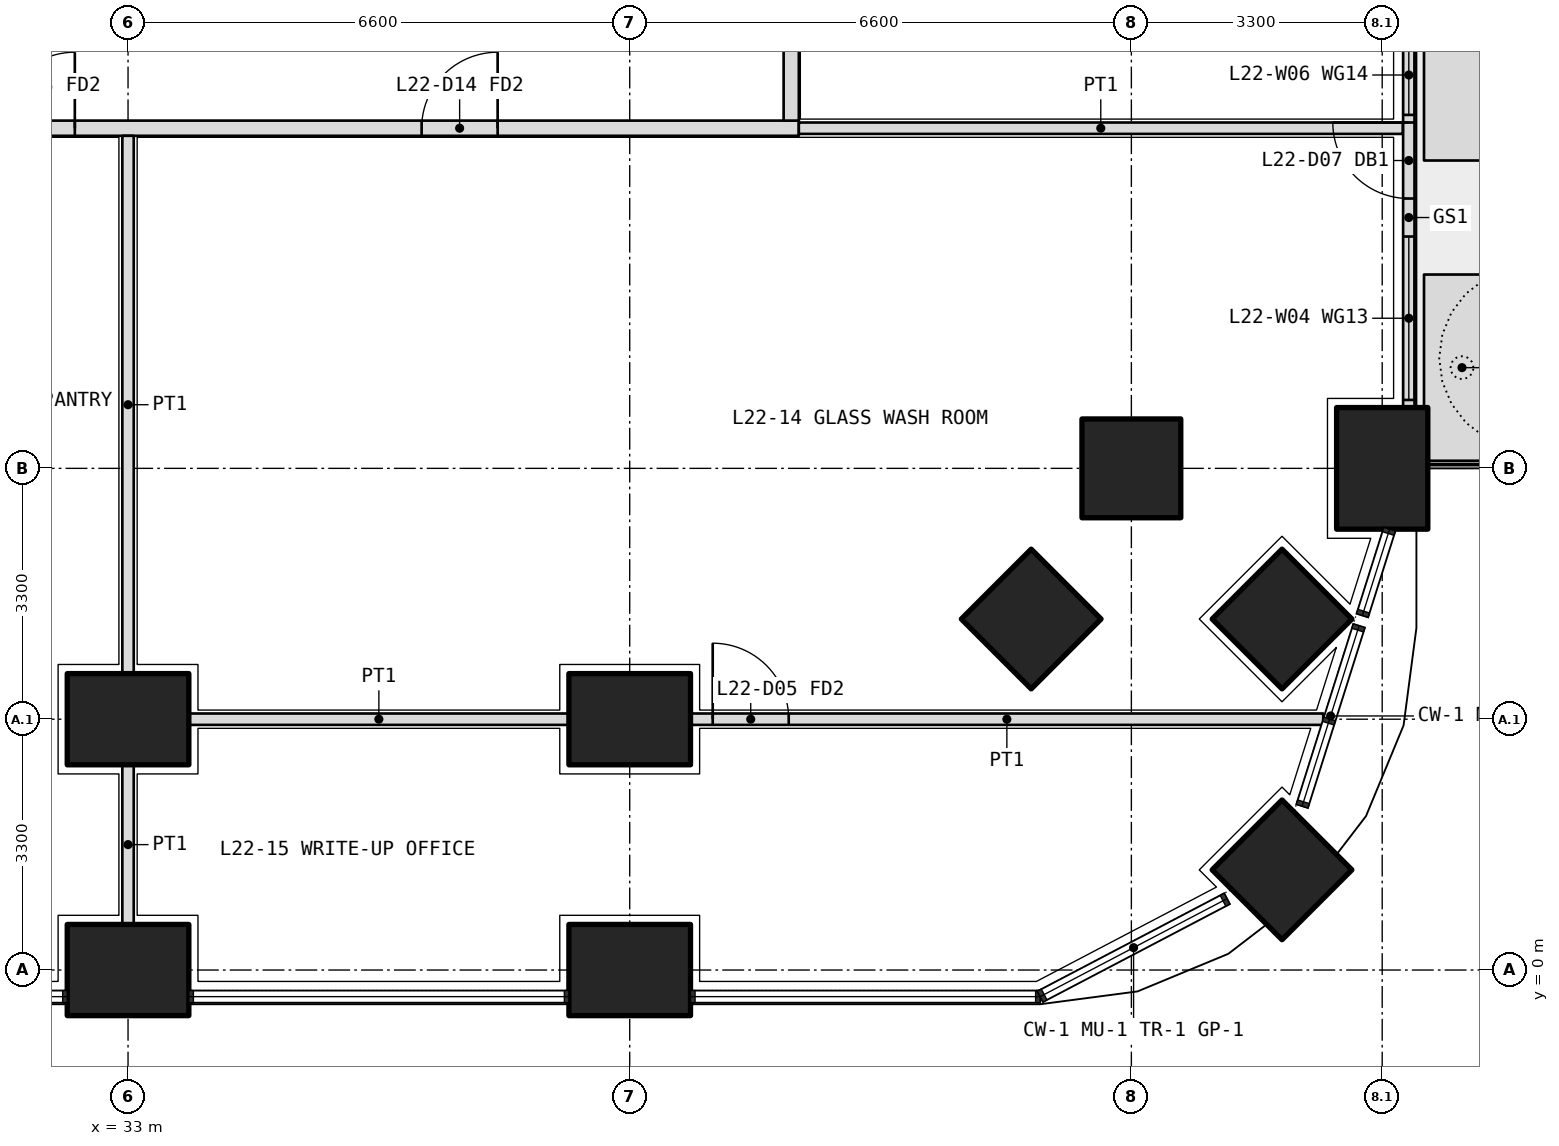
"""IFC4 building model, lengths in metres.
Left out: names, types, materials, properties, quantities, classifications, styles, units other than length and angle.
Written with IfcOpenShell. Run it as: python <this file> out.ifc"""

import sys

from ifc_helpers import new_model, si_unit, direction, frame, frame_2d, origin, origin_2d, place, context, subcontext, project, spatial, polyline, rectangle, outline, extrude, element, fill, save


model = new_model("IFC4")
c1 = context("Model", 3, precision=1e-05, world=origin(), true_north=direction((0.0, 1.0)))
c2 = subcontext(c1, "Body", "Model", "MODEL_VIEW")
j1 = project(units=[si_unit("LENGTHUNIT", "METRE"), si_unit("PLANEANGLEUNIT", "RADIAN")], contexts=[c1])
p1 = place(None, origin())
s1 = spatial("IfcSite", under=j1, at=p1, CompositionType="ELEMENT")
p2 = place(p1, origin())
s2 = spatial("IfcBuilding", under=s1, at=p2, CompositionType="ELEMENT")
p3 = place(p2, frame((0.0, 0.0, 99.0)))
s3 = spatial("IfcBuildingStorey", under=s2, at=p3, CompositionType="ELEMENT", Elevation=99.0)
p4 = place(p3, frame((48.182, 1.318, 0.0), z_axis=(0.0, 0.0, 1.0), x_axis=(0.707106781187, 0.707106781187, 0.0)))
e1 = element("IfcColumn", 1, at=p4, inside=s3, PredefinedType="COLUMN", context=c2, shape_type="SweptSolid", body=[
    extrude(rectangle(XDim=1.3, YDim=1.3, at=origin_2d()), origin(), (0.0, 0.0, 1.0), 4.2),
])
for number, where, z_axis, x_axis in (
    (2, (33.0, 0.0, 0.0), (0.0, 0.0, 1.0), (1.0, 0.0, 0.0)),
    (3, (39.6, 0.0, 0.0), (0.0, 0.0, 1.0), (1.0, 0.0, 0.0)),
    (4, (49.5, 6.6, 0.0), (0.0, 0.0, 1.0), (0.0, 1.0, 0.0)),
):
    element("IfcColumn", number, at=place(p3, frame(where, z_axis=z_axis, x_axis=x_axis)), inside=s3, PredefinedType="COLUMN", context=c2, shape_type="SweptSolid", body=[
        extrude(rectangle(XDim=1.6, YDim=1.2, at=origin_2d()), origin(), (0.0, 0.0, 1.0), 4.2),
    ])
for number, where, z_axis, x_axis in (
    (5, (46.2, 6.6, 0.0), (0.0, 0.0, 1.0), (1.0, 0.0, 0.0)),
    (6, (48.182, 4.618, 0.0), (0.0, 0.0, 1.0), (0.707, 0.707, 0.0)),
):
    element("IfcColumn", number, at=place(p3, frame(where, z_axis=z_axis, x_axis=x_axis)), inside=s3, PredefinedType="COLUMN", context=c2, shape_type="SweptSolid", body=[
        extrude(rectangle(XDim=1.3, YDim=1.3, at=origin_2d()), origin(), (0.0, 0.0, 1.0), 4.2),
    ])
for number, where, z_axis, x_axis in (
    (7, (33.0, 3.3, 0.0), (0.0, 0.0, 1.0), (1.0, 0.0, 0.0)),
    (8, (39.6, 3.3, 0.0), (0.0, 0.0, 1.0), (1.0, 0.0, 0.0)),
):
    element("IfcColumn", number, at=place(p3, frame(where, z_axis=z_axis, x_axis=x_axis)), inside=s3, PredefinedType="COLUMN", context=c2, shape_type="SweptSolid", body=[
        extrude(rectangle(XDim=1.6, YDim=1.2, at=origin_2d()), origin(), (0.0, 0.0, 1.0), 4.2),
    ])
p5 = place(p3, frame((44.882, 4.618, 0.0), z_axis=(0.0, 0.0, 1.0), x_axis=(0.707106781187, 0.707106781187, 0.0)))
e9 = element("IfcColumn", 9, at=p5, inside=s3, PredefinedType="COLUMN", context=c2, shape_type="SweptSolid", body=[
    extrude(rectangle(XDim=1.3, YDim=1.3, at=origin_2d()), origin(), (0.0, 0.0, 1.0), 4.2),
])
p6 = place(p3, origin())
e10 = element("IfcWall", 10, at=p6, inside=s3, PredefinedType="USERDEFINED", context=c2, shape_type="SweptSolid", body=[
    extrude(outline(polyline([(50.05, 6.7), (51.05, 6.7), (51.05, 9.15), (50.05, 9.15), (50.05, 6.7)]), holes=[polyline([(50.2, 6.85), (50.9, 6.85), (50.9, 9.0), (50.2, 9.0), (50.2, 6.85)])]), origin(), (0.0, 0.0, 1.0), 1.05),
])
p7 = place(p3, origin())
e11 = element("IfcWall", 11, at=p7, inside=s3, PredefinedType="USERDEFINED", context=c2, shape_type="SweptSolid", body=[
    extrude(outline(polyline([(50.05, 10.65), (51.05, 10.65), (51.05, 19.7), (50.05, 19.7), (50.05, 10.65)]), holes=[polyline([(50.2, 10.8), (50.9, 10.8), (50.9, 19.55), (50.2, 19.55), (50.2, 10.8)])]), origin(), (0.0, 0.0, 1.0), 1.05),
])
p8 = place(p3, frame((49.85, 7.4, 0.0), z_axis=(0.0, 0.0, 1.0), x_axis=(0.0, 1.0, 0.0)))
e12 = element("IfcWall", 12, at=p8, inside=s3, PredefinedType="SOLIDWALL", context=c2, shape_type="SweptSolid", body=[
    extrude(rectangle(XDim=5.0, YDim=0.15, at=frame_2d((2.5, 0.0))), origin(), (0.0, 0.0, 1.0), 2.7),
])
p9 = place(p8, frame((2.75, 0.0, 0.0)))
e13 = element("IfcOpeningElement", 13, at=p9, cuts=e12, PredefinedType="OPENING", context=c2, shape_type="SweptSolid", body=[
    extrude(rectangle(XDim=1.0, YDim=2.4, at=frame_2d((0.5, 1.2))), frame((0.0, 0.085, 0.0), z_axis=(0.0, -1.0, 0.0), x_axis=(1.0, 0.0, 0.0)), (0.0, 0.0, 1.0), 0.17),
])
p10 = place(p8, frame((0.1, 0.0, 0.1)))
e14 = element("IfcOpeningElement", 14, at=p10, cuts=e12, PredefinedType="OPENING", context=c2, shape_type="SweptSolid", body=[
    extrude(rectangle(XDim=2.15, YDim=2.3, at=frame_2d((1.075, 1.15))), frame((0.0, 0.085, 0.0), z_axis=(0.0, -1.0, 0.0), x_axis=(1.0, 0.0, 0.0)), (0.0, 0.0, 1.0), 0.17),
])
p11 = place(p8, frame((3.85, 0.0, 0.1)))
e15 = element("IfcOpeningElement", 15, at=p11, cuts=e12, PredefinedType="OPENING", context=c2, shape_type="SweptSolid", body=[
    extrude(rectangle(XDim=1.05, YDim=2.3, at=frame_2d((0.525, 1.15))), frame((0.0, 0.085, 0.0), z_axis=(0.0, -1.0, 0.0), x_axis=(1.0, 0.0, 0.0)), (0.0, 0.0, 1.0), 0.17),
])
p12 = place(p3, frame((10.975, 11.075, 0.0), z_axis=(0.0, 0.0, 1.0), x_axis=(1.0, 0.0, 0.0)))
e16 = element("IfcWall", 16, at=p12, inside=s3, PredefinedType="PARTITIONING", context=c2, shape_type="SweptSolid", body=[
    extrude(rectangle(XDim=30.85, YDim=0.2, at=frame_2d((15.425, 0.0))), origin(), (0.0, 0.0, 1.0), 2.85),
])
p13 = place(p12, frame((0.663, 0.0, 0.0)))
e17 = element("IfcOpeningElement", 17, at=p13, cuts=e16, PredefinedType="OPENING", context=c2, shape_type="SweptSolid", body=[
    extrude(rectangle(XDim=1.0, YDim=2.1, at=frame_2d((0.5, 1.05))), frame((0.0, 0.11, 0.0), z_axis=(0.0, -1.0, 0.0), x_axis=(1.0, 0.0, 0.0)), (0.0, 0.0, 1.0), 0.22),
])
p14 = place(p12, frame((3.275, 0.0, 0.0)))
e18 = element("IfcOpeningElement", 18, at=p14, cuts=e16, PredefinedType="OPENING", context=c2, shape_type="SweptSolid", body=[
    extrude(rectangle(XDim=1.2, YDim=2.1, at=frame_2d((0.6, 1.05))), frame((0.0, 0.11, 0.0), z_axis=(0.0, -1.0, 0.0), x_axis=(1.0, 0.0, 0.0)), (0.0, 0.0, 1.0), 0.22),
])
p15 = place(p12, frame((8.325, 0.0, 0.0)))
e19 = element("IfcOpeningElement", 19, at=p15, cuts=e16, PredefinedType="OPENING", context=c2, shape_type="SweptSolid", body=[
    extrude(rectangle(XDim=1.0, YDim=2.1, at=frame_2d((0.5, 1.05))), frame((0.0, 0.11, 0.0), z_axis=(0.0, -1.0, 0.0), x_axis=(1.0, 0.0, 0.0)), (0.0, 0.0, 1.0), 0.22),
])
p16 = place(p12, frame((13.275, 0.0, 0.0)))
e20 = element("IfcOpeningElement", 20, at=p16, cuts=e16, PredefinedType="OPENING", context=c2, shape_type="SweptSolid", body=[
    extrude(rectangle(XDim=1.0, YDim=2.1, at=frame_2d((0.5, 1.05))), frame((0.0, 0.11, 0.0), z_axis=(0.0, -1.0, 0.0), x_axis=(1.0, 0.0, 0.0)), (0.0, 0.0, 1.0), 0.22),
])
p17 = place(p12, frame((17.025, 0.0, 0.0)))
e21 = element("IfcOpeningElement", 21, at=p17, cuts=e16, PredefinedType="OPENING", context=c2, shape_type="SweptSolid", body=[
    extrude(rectangle(XDim=1.0, YDim=2.1, at=frame_2d((0.5, 1.05))), frame((0.0, 0.11, 0.0), z_axis=(0.0, -1.0, 0.0), x_axis=(1.0, 0.0, 0.0)), (0.0, 0.0, 1.0), 0.22),
])
p18 = place(p12, frame((20.325, 0.0, 0.0)))
e22 = element("IfcOpeningElement", 22, at=p18, cuts=e16, PredefinedType="OPENING", context=c2, shape_type="SweptSolid", body=[
    extrude(rectangle(XDim=1.0, YDim=2.1, at=frame_2d((0.5, 1.05))), frame((0.0, 0.11, 0.0), z_axis=(0.0, -1.0, 0.0), x_axis=(1.0, 0.0, 0.0)), (0.0, 0.0, 1.0), 0.22),
])
p19 = place(p12, frame((25.887, 0.0, 0.0)))
e23 = element("IfcOpeningElement", 23, at=p19, cuts=e16, PredefinedType="OPENING", context=c2, shape_type="SweptSolid", body=[
    extrude(rectangle(XDim=1.0, YDim=2.1, at=frame_2d((0.5, 1.05))), frame((0.0, 0.11, 0.0), z_axis=(0.0, -1.0, 0.0), x_axis=(1.0, 0.0, 0.0)), (0.0, 0.0, 1.0), 0.22),
])
p20 = place(p3, frame((41.725, 11.175, 0.0), z_axis=(0.0, 0.0, 1.0), x_axis=(0.0, 1.0, 0.0)))
e24 = element("IfcWall", 24, at=p20, inside=s3, PredefinedType="PARTITIONING", context=c2, shape_type="SweptSolid", body=[
    extrude(rectangle(XDim=5.325, YDim=0.2, at=frame_2d((2.663, 0.0))), origin(), (0.0, 0.0, 1.0), 2.85),
])
p21 = place(p20, frame((2.113, 0.0, 0.0)))
e25 = element("IfcOpeningElement", 25, at=p21, cuts=e24, PredefinedType="OPENING", context=c2, shape_type="SweptSolid", body=[
    extrude(rectangle(XDim=1.0, YDim=2.1, at=frame_2d((0.5, 1.05))), frame((0.0, 0.11, 0.0), z_axis=(0.0, -1.0, 0.0), x_axis=(1.0, 0.0, 0.0)), (0.0, 0.0, 1.0), 0.22),
])
p22 = place(p3, frame((49.77, 11.075, 0.0), z_axis=(0.0, 0.0, 1.0), x_axis=(-1.0, 0.0, 0.0)))
e26 = element("IfcWall", 26, at=p22, inside=s3, PredefinedType="PARTITIONING", context=c2, shape_type="SweptSolid", body=[
    extrude(rectangle(XDim=7.945, YDim=0.15, at=frame_2d((3.973, 0.0))), origin(), (0.0, 0.0, 1.0), 2.7),
])
p23 = place(p3, frame((33.8, 3.3, 0.0), z_axis=(0.0, 0.0, 1.0), x_axis=(1.0, 0.0, 0.0)))
e27 = element("IfcWall", 27, at=p23, inside=s3, PredefinedType="PARTITIONING", context=c2, shape_type="SweptSolid", body=[
    extrude(rectangle(XDim=5.0, YDim=0.15, at=frame_2d((2.5, 0.0))), origin(), (0.0, 0.0, 1.0), 3.9),
])
p24 = place(p3, frame((40.4, 3.3, 0.0), z_axis=(0.0, 0.0, 1.0), x_axis=(1.0, 0.0, 0.0)))
e28 = element("IfcWall", 28, at=p24, inside=s3, PredefinedType="PARTITIONING", context=c2, shape_type="SweptSolid", body=[
    extrude(rectangle(XDim=8.324, YDim=0.15, at=frame_2d((4.162, 0.0))), origin(), (0.0, 0.0, 1.0), 2.7),
])
p25 = place(p24, frame((0.292, 0.0, 0.0)))
e29 = element("IfcOpeningElement", 29, at=p25, cuts=e28, PredefinedType="OPENING", context=c2, shape_type="SweptSolid", body=[
    extrude(rectangle(XDim=1.0, YDim=2.1, at=frame_2d((0.5, 1.05))), frame((0.0, 0.085, 0.0), z_axis=(0.0, -1.0, 0.0), x_axis=(1.0, 0.0, 0.0)), (0.0, 0.0, 1.0), 0.17),
])
p26 = place(p3, frame((33.0, 0.6, 0.0), z_axis=(0.0, 0.0, 1.0), x_axis=(0.0, 1.0, 0.0)))
e30 = element("IfcWall", 30, at=p26, inside=s3, PredefinedType="PARTITIONING", context=c2, shape_type="SweptSolid", body=[
    extrude(rectangle(XDim=2.1, YDim=0.15, at=frame_2d((1.05, 0.0))), origin(), (0.0, 0.0, 1.0), 2.85),
])
p27 = place(p3, frame((33.0, 3.9, 0.0), z_axis=(0.0, 0.0, 1.0), x_axis=(0.0, 1.0, 0.0)))
e31 = element("IfcWall", 31, at=p27, inside=s3, PredefinedType="PARTITIONING", context=c2, shape_type="SweptSolid", body=[
    extrude(rectangle(XDim=7.075, YDim=0.15, at=frame_2d((3.538, 0.0))), origin(), (0.0, 0.0, 1.0), 2.85),
])
p28 = place(p9, origin())
e32 = element("IfcDoor", 32, at=p28, inside=s3, OperationType="SINGLE_SWING_RIGHT", PredefinedType="DOOR", context=c2, shape_type="SweptSolid", body=[
    extrude(rectangle(XDim=1.0, YDim=2.4, at=frame_2d((0.5, 1.2))), frame((0.0, 0.025, 0.0), z_axis=(0.0, -1.0, 0.0), x_axis=(1.0, 0.0, 0.0)), (0.0, 0.0, 1.0), 0.05),
])
fill(e13, e32)
p29 = place(p10, origin())
e33 = element("IfcWindow", 33, at=p29, inside=s3, PartitioningType="SINGLE_PANEL", PredefinedType="WINDOW", context=c2, shape_type="SweptSolid", body=[
    extrude(rectangle(XDim=2.15, YDim=2.3, at=frame_2d((1.075, 1.15))), frame((0.0, 0.03, 0.0), z_axis=(0.0, -1.0, 0.0), x_axis=(1.0, 0.0, 0.0)), (0.0, 0.0, 1.0), 0.06),
])
fill(e14, e33)
p30 = place(p11, origin())
e34 = element("IfcWindow", 34, at=p30, inside=s3, PartitioningType="SINGLE_PANEL", PredefinedType="WINDOW", context=c2, shape_type="SweptSolid", body=[
    extrude(rectangle(XDim=1.05, YDim=2.3, at=frame_2d((0.525, 1.15))), frame((0.0, 0.03, 0.0), z_axis=(0.0, -1.0, 0.0), x_axis=(1.0, 0.0, 0.0)), (0.0, 0.0, 1.0), 0.06),
])
fill(e15, e34)
p31 = place(p18, origin())
e35 = element("IfcDoor", 35, at=p31, inside=s3, OperationType="SINGLE_SWING_RIGHT", PredefinedType="DOOR", context=c2, shape_type="SweptSolid", body=[
    extrude(rectangle(XDim=1.0, YDim=2.1, at=frame_2d((0.5, 1.05))), frame((0.0, 0.025, 0.0), z_axis=(0.0, -1.0, 0.0), x_axis=(1.0, 0.0, 0.0)), (0.0, 0.0, 1.0), 0.05),
])
fill(e22, e35)
p32 = place(p19, origin())
e36 = element("IfcDoor", 36, at=p32, inside=s3, OperationType="SINGLE_SWING_RIGHT", PredefinedType="DOOR", context=c2, shape_type="SweptSolid", body=[
    extrude(rectangle(XDim=1.0, YDim=2.1, at=frame_2d((0.5, 1.05))), frame((0.0, 0.025, 0.0), z_axis=(0.0, -1.0, 0.0), x_axis=(1.0, 0.0, 0.0)), (0.0, 0.0, 1.0), 0.05),
])
fill(e23, e36)
p33 = place(p25, origin())
e37 = element("IfcDoor", 37, at=p33, inside=s3, OperationType="SINGLE_SWING_LEFT", PredefinedType="DOOR", context=c2, shape_type="SweptSolid", body=[
    extrude(rectangle(XDim=1.0, YDim=2.1, at=frame_2d((0.5, 1.05))), frame((0.0, 0.025, 0.0), z_axis=(0.0, -1.0, 0.0), x_axis=(1.0, 0.0, 0.0)), (0.0, 0.0, 1.0), 0.05),
])
fill(e29, e37)
save(model, sys.argv[1])
